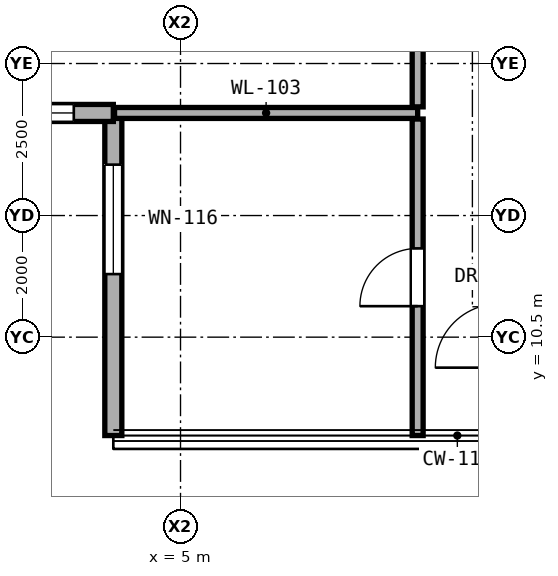
"""IFC4 building model, lengths in metres.
Left out: names, types, materials, properties, quantities, classifications, styles, units other than length and angle.
Written with IfcOpenShell. Run it as: python <this file> out.ifc"""

import sys

from ifc_helpers import new_model, si_unit, direction, frame, frame_2d, origin, place, context, subcontext, project, spatial, rectangle, extrude, element, fill, save


model = new_model("IFC4")
c1 = context("Model", 3, precision=1e-05, world=origin(), true_north=direction((0.0, 1.0)))
c2 = subcontext(c1, "Body", "Model", "MODEL_VIEW")
j1 = project(units=[si_unit("LENGTHUNIT", "METRE"), si_unit("PLANEANGLEUNIT", "RADIAN")], contexts=[c1])
p1 = place(None, origin())
s1 = spatial("IfcSite", under=j1, at=p1, CompositionType="ELEMENT")
p2 = place(p1, origin())
s2 = spatial("IfcBuilding", under=s1, at=p2, CompositionType="ELEMENT")
p3 = place(p2, frame((0.0, 0.0, 108.2)))
s3 = spatial("IfcBuildingStorey", under=s2, at=p3, CompositionType="ELEMENT", Elevation=108.2)
p4 = place(p3, frame((3.895, 14.187, 0.0), z_axis=(0.0, 0.0, 1.0), x_axis=(0.0, -1.0, 0.0)))
e1 = element("IfcWall", 1, at=p4, inside=s3, PredefinedType="SOLIDWALL", context=c2, shape_type="SweptSolid", body=[
    extrude(rectangle(XDim=5.305, YDim=0.28, at=frame_2d((2.652, 0.0))), origin(), (0.0, 0.0, 1.0), 3.06),
])
p5 = place(p4, frame((0.85, 0.0, 0.81)))
e2 = element("IfcOpeningElement", 2, at=p5, cuts=e1, PredefinedType="OPENING", context=c2, shape_type="SweptSolid", body=[
    extrude(rectangle(XDim=1.8, YDim=2.1, at=frame_2d((0.9, 1.05))), frame((0.0, 0.15, 0.0), z_axis=(0.0, -1.0, 0.0), x_axis=(1.0, 0.0, 0.0)), (0.0, 0.0, 1.0), 0.3),
])
p6 = place(p3, frame((-1.41, 14.187, 0.0), z_axis=(0.0, 0.0, 1.0), x_axis=(1.0, 0.0, 0.0)))
e3 = element("IfcWall", 3, at=p6, inside=s3, PredefinedType="SOLIDWALL", context=c2, shape_type="SweptSolid", body=[
    extrude(rectangle(XDim=5.305, YDim=0.28, at=frame_2d((2.652, 0.0))), origin(), (0.0, 0.0, 1.0), 3.06),
])
p7 = place(p6, frame((3.555, 0.0, 0.85)))
e4 = element("IfcOpeningElement", 4, at=p7, cuts=e3, PredefinedType="OPENING", context=c2, shape_type="SweptSolid", body=[
    extrude(rectangle(XDim=1.1, YDim=2.0, at=frame_2d((0.55, 1.0))), frame((0.0, 0.15, 0.0), z_axis=(0.0, -1.0, 0.0), x_axis=(1.0, 0.0, 0.0)), (0.0, 0.0, 1.0), 0.3),
])
p8 = place(p3, frame((3.915, 14.187, 0.0), z_axis=(0.0, 0.0, 1.0), x_axis=(1.0, 0.0, 0.0)))
e5 = element("IfcWall", 5, at=p8, inside=s3, PredefinedType="PARTITIONING", context=c2, shape_type="SweptSolid", body=[
    extrude(rectangle(XDim=4.985, YDim=0.18, at=frame_2d((2.492, 0.0))), origin(), (0.0, 0.0, 1.0), 3.08),
])
p9 = place(p3, frame((8.9, 8.882, 0.0), z_axis=(0.0, 0.0, 1.0), x_axis=(0.0, 1.0, 0.0)))
e6 = element("IfcWall", 6, at=p9, inside=s3, PredefinedType="PARTITIONING", context=c2, shape_type="SweptSolid", body=[
    extrude(rectangle(XDim=5.205, YDim=0.18, at=frame_2d((2.603, 0.0))), origin(), (0.0, 0.0, 1.0), 3.08),
])
p10 = place(p9, frame((2.127, 0.0, 0.0)))
e7 = element("IfcOpeningElement", 7, at=p10, cuts=e6, PredefinedType="OPENING", context=c2, shape_type="SweptSolid", body=[
    extrude(rectangle(XDim=0.95, YDim=2.15, at=frame_2d((0.475, 1.075))), frame((0.0, 0.1, 0.0), z_axis=(0.0, -1.0, 0.0), x_axis=(1.0, 0.0, 0.0)), (0.0, 0.0, 1.0), 0.2),
])
p11 = place(p3, frame((8.9, 14.287, 0.0), z_axis=(0.0, 0.0, 1.0), x_axis=(0.0, 1.0, 0.0)))
e8 = element("IfcWall", 8, at=p11, inside=s3, PredefinedType="PARTITIONING", context=c2, shape_type="SweptSolid", body=[
    extrude(rectangle(XDim=8.113, YDim=0.18, at=frame_2d((4.056, 0.0))), origin(), (0.0, 0.0, 1.0), 2.456),
])
p12 = place(p11, frame((3.531, 0.0, 0.0)))
e9 = element("IfcOpeningElement", 9, at=p12, cuts=e8, PredefinedType="OPENING", context=c2, shape_type="SweptSolid", body=[
    extrude(rectangle(XDim=1.05, YDim=2.2, at=frame_2d((0.525, 1.1))), frame((0.0, 0.1, 0.0), z_axis=(0.0, -1.0, 0.0), x_axis=(1.0, 0.0, 0.0)), (0.0, 0.0, 1.0), 0.2),
])
p13 = place(p5, origin())
e10 = element("IfcWindow", 10, at=p13, inside=s3, PartitioningType="SINGLE_PANEL", PredefinedType="WINDOW", context=c2, shape_type="SweptSolid", body=[
    extrude(rectangle(XDim=1.8, YDim=2.1, at=frame_2d((0.9, 1.05))), frame((0.0, 0.03, 0.0), z_axis=(0.0, -1.0, 0.0), x_axis=(1.0, 0.0, 0.0)), (0.0, 0.0, 1.0), 0.06),
])
fill(e2, e10)
p14 = place(p7, origin())
e11 = element("IfcWindow", 11, at=p14, inside=s3, PartitioningType="SINGLE_PANEL", PredefinedType="WINDOW", context=c2, shape_type="SweptSolid", body=[
    extrude(rectangle(XDim=1.1, YDim=2.0, at=frame_2d((0.55, 1.0))), frame((0.0, 0.03, 0.0), z_axis=(0.0, -1.0, 0.0), x_axis=(1.0, 0.0, 0.0)), (0.0, 0.0, 1.0), 0.06),
])
fill(e4, e11)
p15 = place(p10, origin())
e12 = element("IfcDoor", 12, at=p15, inside=s3, OperationType="SINGLE_SWING_LEFT", PredefinedType="DOOR", context=c2, shape_type="SweptSolid", body=[
    extrude(rectangle(XDim=0.95, YDim=2.15, at=frame_2d((0.475, 1.075))), frame((0.0, 0.025, 0.0), z_axis=(0.0, -1.0, 0.0), x_axis=(1.0, 0.0, 0.0)), (0.0, 0.0, 1.0), 0.05),
])
fill(e7, e12)
save(model, sys.argv[1])
